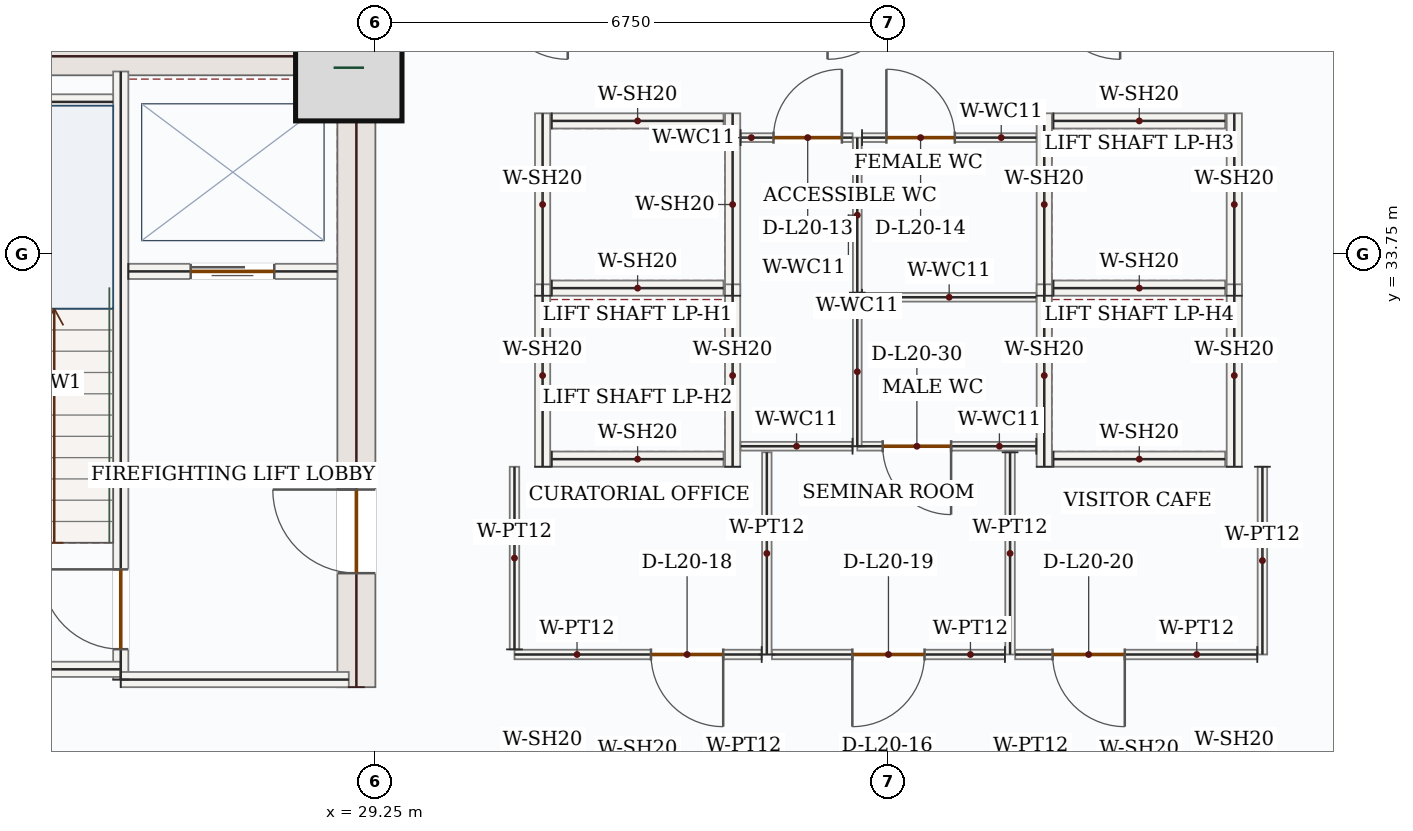
"""IFC4 building model, lengths in metres.
Left out: names, types, materials, properties, quantities, classifications, styles, units other than length and angle.
Written with IfcOpenShell. Run it as: python <this file> out.ifc"""

import sys

from ifc_helpers import new_model, si_unit, direction, frame, frame_2d, origin, origin_2d, place, context, subcontext, project, spatial, rectangle, extrude, source, transform, mapped, element, fill, save


model = new_model("IFC4")
c1 = context("Model", 3, precision=1e-05, world=origin(), true_north=direction((0.0, 1.0)))
c2 = subcontext(c1, "Body", "Model", "MODEL_VIEW")
j1 = project(units=[si_unit("LENGTHUNIT", "METRE"), si_unit("PLANEANGLEUNIT", "RADIAN")], contexts=[c1])
p1 = place(None, origin())
s1 = spatial("IfcSite", under=j1, at=p1, CompositionType="ELEMENT")
p2 = place(p1, origin())
s2 = spatial("IfcBuilding", under=s1, at=p2, CompositionType="ELEMENT")
p3 = place(p2, frame((0.0, 0.0, 92.1)))
s3 = spatial("IfcBuildingStorey", under=s2, at=p3, CompositionType="ELEMENT", Elevation=92.1)
p4 = place(p3, frame((29.0, 28.05, 0.0), z_axis=(0.0, 0.0, 1.0), x_axis=(0.0, 1.0, 0.0)))
e1 = element("IfcWall", 1, at=p4, inside=s3, PredefinedType="SHEAR", context=c2, shape_type="SweptSolid", body=[
    extrude(rectangle(XDim=8.55, YDim=0.5, at=frame_2d((4.275, 0.0))), origin(), (0.0, 0.0, 1.0), 3.95),
])
p5 = place(p4, frame((1.5, 0.0, 0.0)))
e2 = element("IfcOpeningElement", 2, at=p5, cuts=e1, PredefinedType="OPENING", context=c2, shape_type="SweptSolid", body=[
    extrude(rectangle(XDim=1.1, YDim=2.2, at=frame_2d((0.55, 1.1))), frame((0.0, 0.26, 0.0), z_axis=(0.0, -1.0, 0.0), x_axis=(1.0, 0.0, 0.0)), (0.0, 0.0, 1.0), 0.52),
])
m1 = source(origin(), c2, "Body", "SweptSolid", [
    extrude(rectangle(XDim=7.0, YDim=0.5, at=frame_2d((3.5, 0.0))), origin(), (0.0, 0.0, 1.0), 3.95),
])
p6 = place(p3, frame((21.75, 36.35, 0.0), z_axis=(0.0, 0.0, 1.0), x_axis=(1.0, 0.0, 0.0)))
e3 = element("IfcWall", 3, at=p6, inside=s3, PredefinedType="SHEAR", context=c2, shape_type="MappedRepresentation", body=[
    mapped(m1, transform((0.0, 0.0, 0.0), x_axis=(1.0, 0.0, 0.0), y_axis=(0.0, 1.0, 0.0), z_axis=(0.0, 0.0, 1.0), scale=1.0)),
])
m2 = source(origin(), c2, "Body", "SweptSolid", [
    extrude(rectangle(XDim=1.4, YDim=1.4, at=origin_2d()), origin(), (0.0, 0.0, 1.0), 4.2),
])
p7 = place(p3, frame((28.9, 36.2, 0.0), z_axis=(0.0, 0.0, 1.0), x_axis=(1.0, 0.0, 0.0)))
e4 = element("IfcColumn", 4, at=p7, inside=s3, PredefinedType="COLUMN", context=c2, shape_type="MappedRepresentation", body=[
    mapped(m2, transform((0.0, 0.0, 0.0), x_axis=(1.0, 0.0, 0.0), y_axis=(0.0, 1.0, 0.0), z_axis=(0.0, 0.0, 1.0), scale=1.0)),
])
p8 = place(p3, frame((25.9, 28.15, 0.0), z_axis=(0.0, 0.0, 1.0), x_axis=(0.0, 1.0, 0.0)))
e5 = element("IfcWall", 5, at=p8, inside=s3, PredefinedType="SOLIDWALL", context=c2, shape_type="SweptSolid", body=[
    extrude(rectangle(XDim=8.0, YDim=0.2, at=frame_2d((4.0, 0.0))), origin(), (0.0, 0.0, 1.0), 3.95),
])
p9 = place(p8, frame((0.4, 0.0, 0.0)))
e6 = element("IfcOpeningElement", 6, at=p9, cuts=e5, PredefinedType="OPENING", context=c2, shape_type="SweptSolid", body=[
    extrude(rectangle(XDim=1.05, YDim=2.15, at=frame_2d((0.525, 1.075))), frame((0.0, 0.11, 0.0), z_axis=(0.0, -1.0, 0.0), x_axis=(1.0, 0.0, 0.0)), (0.0, 0.0, 1.0), 0.22),
])
m3 = source(origin(), c2, "Body", "SweptSolid", [
    extrude(rectangle(XDim=4.25, YDim=0.2, at=frame_2d((2.125, 0.0))), origin(), (0.0, 0.0, 1.0), 3.95),
])
p10 = place(p3, frame((21.65, 28.285, 0.0), z_axis=(0.0, 0.0, 1.0), x_axis=(1.0, 0.0, 0.0)))
e7 = element("IfcWall", 7, at=p10, inside=s3, PredefinedType="SOLIDWALL", context=c2, shape_type="MappedRepresentation", body=[
    mapped(m3, transform((0.0, 0.0, 0.0), x_axis=(1.0, 0.0, 0.0), y_axis=(0.0, 1.0, 0.0), z_axis=(0.0, 0.0, 1.0), scale=1.0)),
])
m4 = source(origin(), c2, "Body", "SweptSolid", [
    extrude(rectangle(XDim=3.0, YDim=0.2, at=frame_2d((1.5, 0.0))), origin(), (0.0, 0.0, 1.0), 3.95),
])
p11 = place(p3, frame((25.9, 28.15, 0.0), z_axis=(0.0, 0.0, 1.0), x_axis=(1.0, 0.0, 0.0)))
e8 = element("IfcWall", 8, at=p11, inside=s3, PredefinedType="SOLIDWALL", context=c2, shape_type="MappedRepresentation", body=[
    mapped(m4, transform((0.0, 0.0, 0.0), x_axis=(1.0, 0.0, 0.0), y_axis=(0.0, 1.0, 0.0), z_axis=(0.0, 0.0, 1.0), scale=1.0)),
])
m5 = source(origin(), c2, "Body", "SweptSolid", [
    extrude(rectangle(XDim=3.25, YDim=0.2, at=frame_2d((1.625, 0.0))), origin(), (0.0, 0.0, 1.0), 3.95),
])
p12 = place(p3, frame((22.55, 35.75, 0.0), z_axis=(0.0, 0.0, 1.0), x_axis=(1.0, 0.0, 0.0)))
e9 = element("IfcWall", 9, at=p12, inside=s3, PredefinedType="SOLIDWALL", context=c2, shape_type="MappedRepresentation", body=[
    mapped(m5, transform((0.0, 0.0, 0.0), x_axis=(1.0, 0.0, 0.0), y_axis=(0.0, 1.0, 0.0), z_axis=(0.0, 0.0, 1.0), scale=1.0)),
])
p13 = place(p3, frame((26.0, 33.52, 0.0), z_axis=(0.0, 0.0, 1.0), x_axis=(1.0, 0.0, 0.0)))
e10 = element("IfcWall", 10, at=p13, inside=s3, PredefinedType="SOLIDWALL", context=c2, shape_type="SweptSolid", body=[
    extrude(rectangle(XDim=2.75, YDim=0.2, at=frame_2d((1.375, 0.0))), origin(), (0.0, 0.0, 1.0), 3.95),
])
p14 = place(p13, frame((0.82, 0.0, 0.0)))
e11 = element("IfcOpeningElement", 11, at=p14, cuts=e10, PredefinedType="OPENING", context=c2, shape_type="SweptSolid", body=[
    extrude(rectangle(XDim=1.1, YDim=2.15, at=frame_2d((0.55, 1.075))), frame((0.0, 0.11, 0.0), z_axis=(0.0, -1.0, 0.0), x_axis=(1.0, 0.0, 0.0)), (0.0, 0.0, 1.0), 0.22),
])
m6 = source(origin(), c2, "Body", "SweptSolid", [
    extrude(rectangle(XDim=2.4, YDim=0.2, at=frame_2d((1.2, 0.0))), origin(), (0.0, 0.0, 1.0), 3.95),
])
for number, where, z_axis, x_axis in (
    (12, (31.45, 33.2, 0.0), (0.0, 0.0, 1.0), (0.0, 1.0, 0.0)),
    (13, (33.95, 33.2, 0.0), (0.0, 0.0, 1.0), (0.0, 1.0, 0.0)),
):
    element("IfcWall", number, at=place(p3, frame(where, z_axis=z_axis, x_axis=x_axis)), inside=s3, PredefinedType="SOLIDWALL", context=c2, shape_type="MappedRepresentation", body=[
        mapped(m6, transform((0.0, 0.0, 0.0), x_axis=(1.0, 0.0, 0.0), y_axis=(0.0, 1.0, 0.0), z_axis=(0.0, 0.0, 1.0), scale=1.0)),
    ])
m7 = source(origin(), c2, "Body", "SweptSolid", [
    extrude(rectangle(XDim=2.26, YDim=0.2, at=frame_2d((1.13, 0.0))), origin(), (0.0, 0.0, 1.0), 3.95),
])
for number, where, z_axis, x_axis in (
    (14, (31.57, 33.3, 0.0), (0.0, 0.0, 1.0), (1.0, 0.0, 0.0)),
    (15, (31.57, 35.5, 0.0), (0.0, 0.0, 1.0), (1.0, 0.0, 0.0)),
):
    element("IfcWall", number, at=place(p3, frame(where, z_axis=z_axis, x_axis=x_axis)), inside=s3, PredefinedType="SOLIDWALL", context=c2, shape_type="MappedRepresentation", body=[
        mapped(m7, transform((0.0, 0.0, 0.0), x_axis=(1.0, 0.0, 0.0), y_axis=(0.0, 1.0, 0.0), z_axis=(0.0, 0.0, 1.0), scale=1.0)),
    ])
for number, where, z_axis, x_axis in (
    (16, (31.45, 30.95, 0.0), (0.0, 0.0, 1.0), (0.0, 1.0, 0.0)),
    (17, (33.95, 30.95, 0.0), (0.0, 0.0, 1.0), (0.0, 1.0, 0.0)),
):
    element("IfcWall", number, at=place(p3, frame(where, z_axis=z_axis, x_axis=x_axis)), inside=s3, PredefinedType="SOLIDWALL", context=c2, shape_type="MappedRepresentation", body=[
        mapped(m6, transform((0.0, 0.0, 0.0), x_axis=(1.0, 0.0, 0.0), y_axis=(0.0, 1.0, 0.0), z_axis=(0.0, 0.0, 1.0), scale=1.0)),
    ])
p15 = place(p3, frame((31.57, 31.05, 0.0), z_axis=(0.0, 0.0, 1.0), x_axis=(1.0, 0.0, 0.0)))
e18 = element("IfcWall", 18, at=p15, inside=s3, PredefinedType="SOLIDWALL", context=c2, shape_type="MappedRepresentation", body=[
    mapped(m7, transform((0.0, 0.0, 0.0), x_axis=(1.0, 0.0, 0.0), y_axis=(0.0, 1.0, 0.0), z_axis=(0.0, 0.0, 1.0), scale=1.0)),
])
for number, where, z_axis, x_axis in (
    (19, (38.05, 33.2, 0.0), (0.0, 0.0, 1.0), (0.0, 1.0, 0.0)),
    (20, (40.55, 33.2, 0.0), (0.0, 0.0, 1.0), (0.0, 1.0, 0.0)),
):
    element("IfcWall", number, at=place(p3, frame(where, z_axis=z_axis, x_axis=x_axis)), inside=s3, PredefinedType="SOLIDWALL", context=c2, shape_type="MappedRepresentation", body=[
        mapped(m6, transform((0.0, 0.0, 0.0), x_axis=(1.0, 0.0, 0.0), y_axis=(0.0, 1.0, 0.0), z_axis=(0.0, 0.0, 1.0), scale=1.0)),
    ])
for number, where, z_axis, x_axis in (
    (21, (38.17, 33.3, 0.0), (0.0, 0.0, 1.0), (1.0, 0.0, 0.0)),
    (22, (38.17, 35.5, 0.0), (0.0, 0.0, 1.0), (1.0, 0.0, 0.0)),
):
    element("IfcWall", number, at=place(p3, frame(where, z_axis=z_axis, x_axis=x_axis)), inside=s3, PredefinedType="SOLIDWALL", context=c2, shape_type="MappedRepresentation", body=[
        mapped(m7, transform((0.0, 0.0, 0.0), x_axis=(1.0, 0.0, 0.0), y_axis=(0.0, 1.0, 0.0), z_axis=(0.0, 0.0, 1.0), scale=1.0)),
    ])
for number, where, z_axis, x_axis in (
    (23, (38.05, 30.95, 0.0), (0.0, 0.0, 1.0), (0.0, 1.0, 0.0)),
    (24, (40.55, 30.95, 0.0), (0.0, 0.0, 1.0), (0.0, 1.0, 0.0)),
):
    element("IfcWall", number, at=place(p3, frame(where, z_axis=z_axis, x_axis=x_axis)), inside=s3, PredefinedType="SOLIDWALL", context=c2, shape_type="MappedRepresentation", body=[
        mapped(m6, transform((0.0, 0.0, 0.0), x_axis=(1.0, 0.0, 0.0), y_axis=(0.0, 1.0, 0.0), z_axis=(0.0, 0.0, 1.0), scale=1.0)),
    ])
p16 = place(p3, frame((38.17, 31.05, 0.0), z_axis=(0.0, 0.0, 1.0), x_axis=(1.0, 0.0, 0.0)))
e25 = element("IfcWall", 25, at=p16, inside=s3, PredefinedType="SOLIDWALL", context=c2, shape_type="MappedRepresentation", body=[
    mapped(m7, transform((0.0, 0.0, 0.0), x_axis=(1.0, 0.0, 0.0), y_axis=(0.0, 1.0, 0.0), z_axis=(0.0, 0.0, 1.0), scale=1.0)),
])
p17 = place(p3, frame((37.945, 31.22, 0.0), z_axis=(0.0, 0.0, 1.0), x_axis=(-1.0, 0.0, 0.0)))
e26 = element("IfcWall", 26, at=p17, inside=s3, PredefinedType="PARTITIONING", context=c2, shape_type="SweptSolid", body=[
    extrude(rectangle(XDim=2.355, YDim=0.115, at=frame_2d((1.177, 0.0))), origin(), (0.0, 0.0, 1.0), 3.95),
])
p18 = place(p17, frame((1.121, 0.0, 0.0)))
e27 = element("IfcOpeningElement", 27, at=p18, cuts=e26, PredefinedType="OPENING", context=c2, shape_type="SweptSolid", body=[
    extrude(rectangle(XDim=0.9, YDim=2.1, at=frame_2d((0.45, 1.05))), frame((0.0, 0.067, 0.0), z_axis=(0.0, -1.0, 0.0), x_axis=(1.0, 0.0, 0.0)), (0.0, 0.0, 1.0), 0.135),
])
m8 = source(origin(), c2, "Body", "SweptSolid", [
    extrude(rectangle(XDim=1.96, YDim=0.115, at=frame_2d((0.98, 0.0))), origin(), (0.0, 0.0, 1.0), 3.95),
])
p19 = place(p3, frame((35.59, 31.22, 0.0), z_axis=(0.0, 0.0, 1.0), x_axis=(0.0, 1.0, 0.0)))
e28 = element("IfcWall", 28, at=p19, inside=s3, PredefinedType="PARTITIONING", context=c2, shape_type="MappedRepresentation", body=[
    mapped(m8, transform((0.0, 0.0, 0.0), x_axis=(1.0, 0.0, 0.0), y_axis=(0.0, 1.0, 0.0), z_axis=(0.0, 0.0, 1.0), scale=1.0)),
])
m9 = source(origin(), c2, "Body", "SweptSolid", [
    extrude(rectangle(XDim=2.292, YDim=0.115, at=frame_2d((1.146, 0.0))), origin(), (0.0, 0.0, 1.0), 3.95),
])
p20 = place(p3, frame((35.653, 33.18, 0.0), z_axis=(0.0, 0.0, 1.0), x_axis=(1.0, 0.0, 0.0)))
e29 = element("IfcWall", 29, at=p20, inside=s3, PredefinedType="PARTITIONING", context=c2, shape_type="MappedRepresentation", body=[
    mapped(m9, transform((0.0, 0.0, 0.0), x_axis=(1.0, 0.0, 0.0), y_axis=(0.0, 1.0, 0.0), z_axis=(0.0, 0.0, 1.0), scale=1.0)),
])
m10 = source(origin(), c2, "Body", "SweptSolid", [
    extrude(rectangle(XDim=2.04, YDim=0.115, at=frame_2d((1.02, 0.0))), origin(), (0.0, 0.0, 1.0), 3.95),
])
p21 = place(p3, frame((35.59, 33.24, 0.0), z_axis=(0.0, 0.0, 1.0), x_axis=(0.0, 1.0, 0.0)))
e30 = element("IfcWall", 30, at=p21, inside=s3, PredefinedType="PARTITIONING", context=c2, shape_type="MappedRepresentation", body=[
    mapped(m10, transform((0.0, 0.0, 0.0), x_axis=(1.0, 0.0, 0.0), y_axis=(0.0, 1.0, 0.0), z_axis=(0.0, 0.0, 1.0), scale=1.0)),
])
p22 = place(p3, frame((35.653, 35.28, 0.0), z_axis=(0.0, 0.0, 1.0), x_axis=(1.0, 0.0, 0.0)))
e31 = element("IfcWall", 31, at=p22, inside=s3, PredefinedType="PARTITIONING", context=c2, shape_type="SweptSolid", body=[
    extrude(rectangle(XDim=2.292, YDim=0.115, at=frame_2d((1.146, 0.0))), origin(), (0.0, 0.0, 1.0), 3.95),
])
p23 = place(p22, frame((0.32, 0.0, 0.0)))
e32 = element("IfcOpeningElement", 32, at=p23, cuts=e31, PredefinedType="OPENING", context=c2, shape_type="SweptSolid", body=[
    extrude(rectangle(XDim=0.9, YDim=2.1, at=frame_2d((0.45, 1.05))), frame((0.0, 0.067, 0.0), z_axis=(0.0, -1.0, 0.0), x_axis=(1.0, 0.0, 0.0)), (0.0, 0.0, 1.0), 0.135),
])
m11 = source(origin(), c2, "Body", "SweptSolid", [
    extrude(rectangle(XDim=1.473, YDim=0.115, at=frame_2d((0.736, 0.0))), origin(), (0.0, 0.0, 1.0), 3.95),
])
p24 = place(p3, frame((35.528, 31.22, 0.0), z_axis=(0.0, 0.0, 1.0), x_axis=(-1.0, 0.0, 0.0)))
e33 = element("IfcWall", 33, at=p24, inside=s3, PredefinedType="PARTITIONING", context=c2, shape_type="MappedRepresentation", body=[
    mapped(m11, transform((0.0, 0.0, 0.0), x_axis=(1.0, 0.0, 0.0), y_axis=(0.0, 1.0, 0.0), z_axis=(0.0, 0.0, 1.0), scale=1.0)),
])
p25 = place(p3, frame((34.055, 35.28, 0.0), z_axis=(0.0, 0.0, 1.0), x_axis=(1.0, 0.0, 0.0)))
e34 = element("IfcWall", 34, at=p25, inside=s3, PredefinedType="PARTITIONING", context=c2, shape_type="SweptSolid", body=[
    extrude(rectangle(XDim=1.473, YDim=0.115, at=frame_2d((0.736, 0.0))), origin(), (0.0, 0.0, 1.0), 3.95),
])
p26 = place(p25, frame((0.433, 0.0, 0.0)))
e35 = element("IfcOpeningElement", 35, at=p26, cuts=e34, PredefinedType="OPENING", context=c2, shape_type="SweptSolid", body=[
    extrude(rectangle(XDim=0.9, YDim=2.1, at=frame_2d((0.45, 1.05))), frame((0.0, 0.067, 0.0), z_axis=(0.0, -1.0, 0.0), x_axis=(1.0, 0.0, 0.0)), (0.0, 0.0, 1.0), 0.135),
])
m12 = source(origin(), c2, "Body", "SweptSolid", [
    extrude(rectangle(XDim=2.66, YDim=0.125, at=frame_2d((1.33, 0.0))), origin(), (0.0, 0.0, 1.0), 3.95),
])
for number, where, z_axis, x_axis in (
    (36, (34.4, 28.48, 0.0), (0.0, 0.0, 1.0), (0.0, 1.0, 0.0)),
    (37, (37.6, 31.14, 0.0), (0.0, 0.0, 1.0), (0.0, -1.0, 0.0)),
):
    element("IfcWall", number, at=place(p3, frame(where, z_axis=z_axis, x_axis=x_axis)), inside=s3, PredefinedType="PARTITIONING", context=c2, shape_type="MappedRepresentation", body=[
        mapped(m12, transform((0.0, 0.0, 0.0), x_axis=(1.0, 0.0, 0.0), y_axis=(0.0, 1.0, 0.0), z_axis=(0.0, 0.0, 1.0), scale=1.0)),
    ])
p27 = place(p3, frame((37.532, 28.48, 0.0), z_axis=(0.0, 0.0, 1.0), x_axis=(-1.0, 0.0, 0.0)))
e38 = element("IfcWall", 38, at=p27, inside=s3, PredefinedType="PARTITIONING", context=c2, shape_type="SweptSolid", body=[
    extrude(rectangle(XDim=3.065, YDim=0.125, at=frame_2d((1.532, 0.0))), origin(), (0.0, 0.0, 1.0), 3.95),
])
p28 = place(p27, frame((1.058, 0.0, 0.0)))
e39 = element("IfcOpeningElement", 39, at=p28, cuts=e38, PredefinedType="OPENING", context=c2, shape_type="SweptSolid", body=[
    extrude(rectangle(XDim=0.95, YDim=2.15, at=frame_2d((0.475, 1.075))), frame((0.0, 0.073, 0.0), z_axis=(0.0, -1.0, 0.0), x_axis=(1.0, 0.0, 0.0)), (0.0, 0.0, 1.0), 0.145),
])
p29 = place(p3, frame((34.333, 28.48, 0.0), z_axis=(0.0, 0.0, 1.0), x_axis=(-1.0, 0.0, 0.0)))
e40 = element("IfcWall", 40, at=p29, inside=s3, PredefinedType="PARTITIONING", context=c2, shape_type="SweptSolid", body=[
    extrude(rectangle(XDim=3.252, YDim=0.125, at=frame_2d((1.626, 0.0))), origin(), (0.0, 0.0, 1.0), 3.95),
])
p30 = place(p29, frame((0.507, 0.0, 0.0)))
e41 = element("IfcOpeningElement", 41, at=p30, cuts=e40, PredefinedType="OPENING", context=c2, shape_type="SweptSolid", body=[
    extrude(rectangle(XDim=0.95, YDim=2.15, at=frame_2d((0.475, 1.075))), frame((0.0, 0.073, 0.0), z_axis=(0.0, -1.0, 0.0), x_axis=(1.0, 0.0, 0.0)), (0.0, 0.0, 1.0), 0.145),
])
m13 = source(origin(), c2, "Body", "SweptSolid", [
    extrude(rectangle(XDim=2.402, YDim=0.125, at=frame_2d((1.201, 0.0))), origin(), (0.0, 0.0, 1.0), 3.95),
])
p31 = place(p3, frame((31.08, 28.548, 0.0), z_axis=(0.0, 0.0, 1.0), x_axis=(0.0, 1.0, 0.0)))
e42 = element("IfcWall", 42, at=p31, inside=s3, PredefinedType="PARTITIONING", context=c2, shape_type="MappedRepresentation", body=[
    mapped(m13, transform((0.0, 0.0, 0.0), x_axis=(1.0, 0.0, 0.0), y_axis=(0.0, 1.0, 0.0), z_axis=(0.0, 0.0, 1.0), scale=1.0)),
])
m14 = source(origin(), c2, "Body", "SweptSolid", [
    extrude(rectangle(XDim=2.47, YDim=0.125, at=frame_2d((1.235, 0.0))), origin(), (0.0, 0.0, 1.0), 3.95),
])
p32 = place(p3, frame((40.92, 30.95, 0.0), z_axis=(0.0, 0.0, 1.0), x_axis=(0.0, -1.0, 0.0)))
e43 = element("IfcWall", 43, at=p32, inside=s3, PredefinedType="PARTITIONING", context=c2, shape_type="MappedRepresentation", body=[
    mapped(m14, transform((0.0, 0.0, 0.0), x_axis=(1.0, 0.0, 0.0), y_axis=(0.0, 1.0, 0.0), z_axis=(0.0, 0.0, 1.0), scale=1.0)),
])
p33 = place(p3, frame((40.853, 28.48, 0.0), z_axis=(0.0, 0.0, 1.0), x_axis=(-1.0, 0.0, 0.0)))
e44 = element("IfcWall", 44, at=p33, inside=s3, PredefinedType="PARTITIONING", context=c2, shape_type="SweptSolid", body=[
    extrude(rectangle(XDim=3.185, YDim=0.125, at=frame_2d((1.593, 0.0))), origin(), (0.0, 0.0, 1.0), 3.95),
])
p34 = place(p33, frame((1.743, 0.0, 0.0)))
e45 = element("IfcOpeningElement", 45, at=p34, cuts=e44, PredefinedType="OPENING", context=c2, shape_type="SweptSolid", body=[
    extrude(rectangle(XDim=0.95, YDim=2.15, at=frame_2d((0.475, 1.075))), frame((0.0, 0.073, 0.0), z_axis=(0.0, -1.0, 0.0), x_axis=(1.0, 0.0, 0.0)), (0.0, 0.0, 1.0), 0.145),
])
m15 = source(origin(), c2, "Body", "SweptSolid", [
    extrude(rectangle(XDim=1.05, YDim=2.15, at=frame_2d((0.525, 1.075))), frame((0.0, 0.025, 0.0), z_axis=(0.0, -1.0, 0.0), x_axis=(1.0, 0.0, 0.0)), (0.0, 0.0, 1.0), 0.05),
])
p35 = place(p9, origin())
e46 = element("IfcDoor", 46, at=p35, inside=s3, OperationType="SINGLE_SWING_RIGHT", PredefinedType="DOOR", context=c2, shape_type="MappedRepresentation", body=[
    mapped(m15, transform((0.0, 0.0, 0.0), x_axis=(1.0, 0.0, 0.0), y_axis=(0.0, 1.0, 0.0), z_axis=(0.0, 0.0, 1.0), scale=1.0)),
])
fill(e6, e46)
m16 = source(origin(), c2, "Body", "SweptSolid", [
    extrude(rectangle(XDim=1.1, YDim=2.15, at=frame_2d((0.55, 1.075))), frame((0.0, 0.025, 0.0), z_axis=(0.0, -1.0, 0.0), x_axis=(1.0, 0.0, 0.0)), (0.0, 0.0, 1.0), 0.05),
])
p36 = place(p14, origin())
e47 = element("IfcDoor", 47, at=p36, inside=s3, OperationType="DOUBLE_DOOR_SLIDING", PredefinedType="DOOR", context=c2, shape_type="MappedRepresentation", body=[
    mapped(m16, transform((0.0, 0.0, 0.0), x_axis=(1.0, 0.0, 0.0), y_axis=(0.0, 1.0, 0.0), z_axis=(0.0, 0.0, 1.0), scale=1.0)),
])
fill(e11, e47)
m17 = source(origin(), c2, "Body", "SweptSolid", [
    extrude(rectangle(XDim=1.1, YDim=2.2, at=frame_2d((0.55, 1.1))), frame((0.0, 0.025, 0.0), z_axis=(0.0, -1.0, 0.0), x_axis=(1.0, 0.0, 0.0)), (0.0, 0.0, 1.0), 0.05),
])
p37 = place(p5, origin())
e48 = element("IfcDoor", 48, at=p37, inside=s3, OperationType="SINGLE_SWING_RIGHT", PredefinedType="DOOR", context=c2, shape_type="MappedRepresentation", body=[
    mapped(m17, transform((0.0, 0.0, 0.0), x_axis=(1.0, 0.0, 0.0), y_axis=(0.0, 1.0, 0.0), z_axis=(0.0, 0.0, 1.0), scale=1.0)),
])
fill(e2, e48)
m18 = source(origin(), c2, "Body", "SweptSolid", [
    extrude(rectangle(XDim=0.9, YDim=2.1, at=frame_2d((0.45, 1.05))), frame((0.0, 0.025, 0.0), z_axis=(0.0, -1.0, 0.0), x_axis=(1.0, 0.0, 0.0)), (0.0, 0.0, 1.0), 0.05),
])
p38 = place(p26, origin())
e49 = element("IfcDoor", 49, at=p38, inside=s3, OperationType="SINGLE_SWING_RIGHT", PredefinedType="DOOR", context=c2, shape_type="MappedRepresentation", body=[
    mapped(m18, transform((0.0, 0.0, 0.0), x_axis=(1.0, 0.0, 0.0), y_axis=(0.0, 1.0, 0.0), z_axis=(0.0, 0.0, 1.0), scale=1.0)),
])
fill(e35, e49)
p39 = place(p23, origin())
e50 = element("IfcDoor", 50, at=p39, inside=s3, OperationType="SINGLE_SWING_LEFT", PredefinedType="DOOR", context=c2, shape_type="MappedRepresentation", body=[
    mapped(m18, transform((0.0, 0.0, 0.0), x_axis=(1.0, 0.0, 0.0), y_axis=(0.0, 1.0, 0.0), z_axis=(0.0, 0.0, 1.0), scale=1.0)),
])
fill(e32, e50)
m19 = source(origin(), c2, "Body", "SweptSolid", [
    extrude(rectangle(XDim=0.95, YDim=2.15, at=frame_2d((0.475, 1.075))), frame((0.0, 0.025, 0.0), z_axis=(0.0, -1.0, 0.0), x_axis=(1.0, 0.0, 0.0)), (0.0, 0.0, 1.0), 0.05),
])
p40 = place(p30, origin())
e51 = element("IfcDoor", 51, at=p40, inside=s3, OperationType="SINGLE_SWING_LEFT", PredefinedType="DOOR", context=c2, shape_type="MappedRepresentation", body=[
    mapped(m19, transform((0.0, 0.0, 0.0), x_axis=(1.0, 0.0, 0.0), y_axis=(0.0, 1.0, 0.0), z_axis=(0.0, 0.0, 1.0), scale=1.0)),
])
fill(e41, e51)
p41 = place(p28, origin())
e52 = element("IfcDoor", 52, at=p41, inside=s3, OperationType="SINGLE_SWING_RIGHT", PredefinedType="DOOR", context=c2, shape_type="MappedRepresentation", body=[
    mapped(m19, transform((0.0, 0.0, 0.0), x_axis=(1.0, 0.0, 0.0), y_axis=(0.0, 1.0, 0.0), z_axis=(0.0, 0.0, 1.0), scale=1.0)),
])
fill(e39, e52)
p42 = place(p34, origin())
e53 = element("IfcDoor", 53, at=p42, inside=s3, OperationType="SINGLE_SWING_LEFT", PredefinedType="DOOR", context=c2, shape_type="MappedRepresentation", body=[
    mapped(m19, transform((0.0, 0.0, 0.0), x_axis=(1.0, 0.0, 0.0), y_axis=(0.0, 1.0, 0.0), z_axis=(0.0, 0.0, 1.0), scale=1.0)),
])
fill(e45, e53)
p43 = place(p18, origin())
e54 = element("IfcDoor", 54, at=p43, inside=s3, OperationType="SINGLE_SWING_LEFT", PredefinedType="DOOR", context=c2, shape_type="MappedRepresentation", body=[
    mapped(m18, transform((0.0, 0.0, 0.0), x_axis=(1.0, 0.0, 0.0), y_axis=(0.0, 1.0, 0.0), z_axis=(0.0, 0.0, 1.0), scale=1.0)),
])
fill(e27, e54)
save(model, sys.argv[1])
